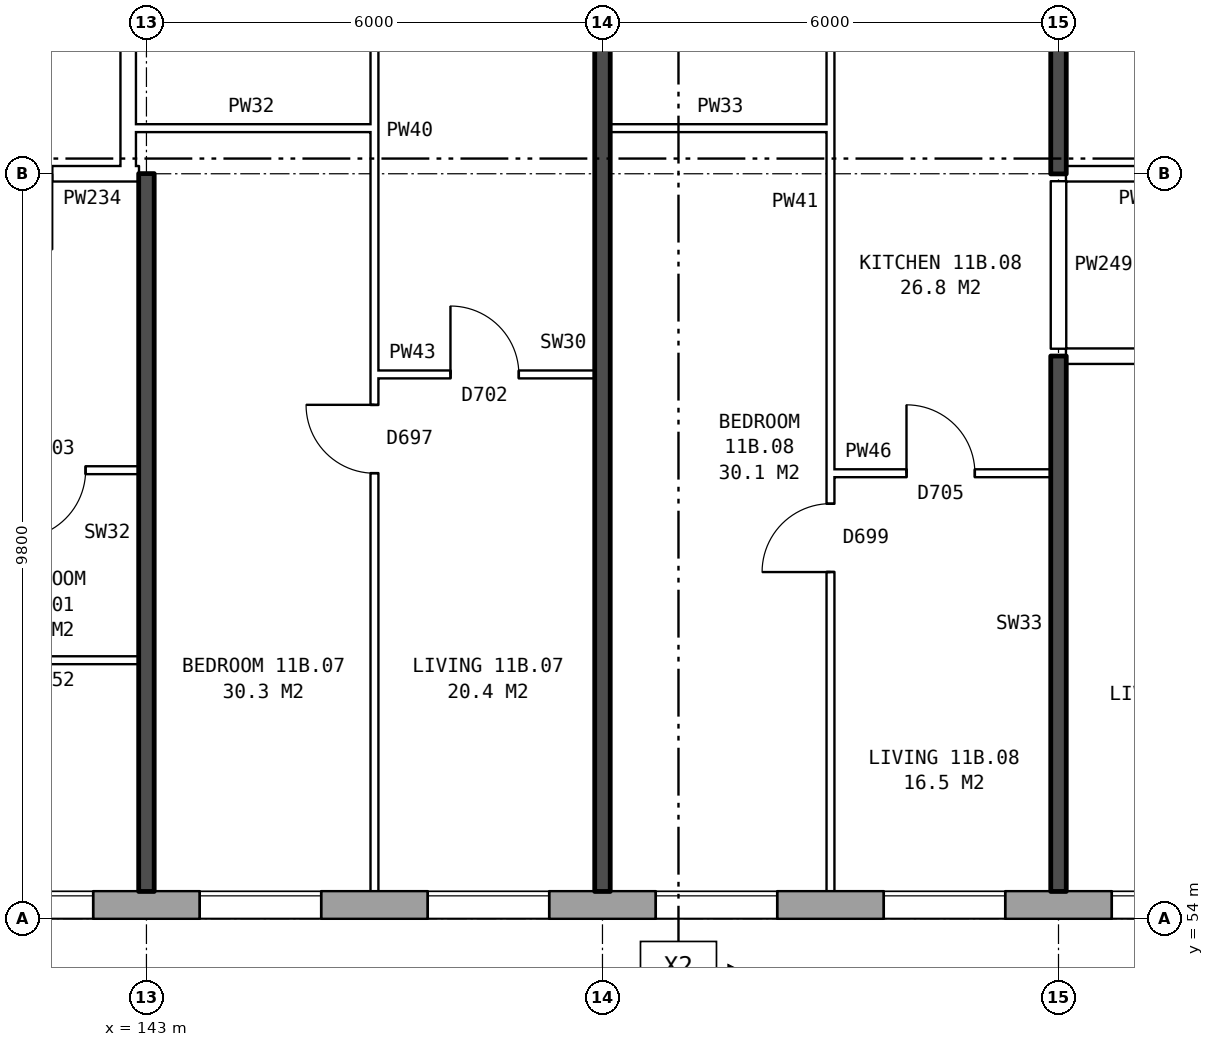
"""IFC4 building model, lengths in metres.
Left out: names, types, materials, properties, quantities, classifications, styles, units other than length and angle.
Written with IfcOpenShell. Run it as: python <this file> out.ifc"""

import sys

from ifc_helpers import new_model, si_unit, direction, frame, frame_2d, origin, place, context, subcontext, project, spatial, rectangle, extrude, element, fill, save


model = new_model("IFC4")
c1 = context("Model", 3, precision=1e-05, world=origin(), true_north=direction((0.0, 1.0)))
c2 = subcontext(c1, "Body", "Model", "MODEL_VIEW")
j1 = project(units=[si_unit("LENGTHUNIT", "METRE"), si_unit("PLANEANGLEUNIT", "RADIAN")], contexts=[c1])
p1 = place(None, origin())
s1 = spatial("IfcSite", under=j1, at=p1, CompositionType="ELEMENT")
p2 = place(p1, origin())
s2 = spatial("IfcBuilding", under=s1, at=p2, CompositionType="ELEMENT")
p3 = place(p2, frame((0.0, 0.0, 44.3)))
s3 = spatial("IfcBuildingStorey", under=s2, at=p3, CompositionType="ELEMENT", Elevation=44.3)
p4 = place(p3, frame((134.075, 54.18, 0.0), z_axis=(0.0, 0.0, 1.0), x_axis=(1.0, 0.0, 0.0)))
e1 = element("IfcWall", 1, at=p4, inside=s3, PredefinedType="STANDARD", context=c2, shape_type="SweptSolid", body=[
    extrude(rectangle(XDim=39.351, YDim=0.36, at=frame_2d((19.675, 0.0))), origin(), (0.0, 0.0, 1.0), 2.85),
])
p5 = place(p4, frame((0.3, 0.0, 0.8)))
e2 = element("IfcOpeningElement", 2, at=p5, cuts=e1, PredefinedType="OPENING", context=c2, shape_type="SweptSolid", body=[
    extrude(rectangle(XDim=0.6, YDim=0.9, at=frame_2d((0.3, 0.45))), frame((0.0, 0.19, 0.0), z_axis=(0.0, -1.0, 0.0), x_axis=(1.0, 0.0, 0.0)), (0.0, 0.0, 1.0), 0.38),
])
p6 = place(p4, frame((3.625, 0.0, 0.8)))
e3 = element("IfcOpeningElement", 3, at=p6, cuts=e1, PredefinedType="OPENING", context=c2, shape_type="SweptSolid", body=[
    extrude(rectangle(XDim=1.6, YDim=1.8, at=frame_2d((0.8, 0.9))), frame((0.0, 0.19, 0.0), z_axis=(0.0, -1.0, 0.0), x_axis=(1.0, 0.0, 0.0)), (0.0, 0.0, 1.0), 0.38),
])
p7 = place(p4, frame((6.625, 0.0, 0.8)))
e4 = element("IfcOpeningElement", 4, at=p7, cuts=e1, PredefinedType="OPENING", context=c2, shape_type="SweptSolid", body=[
    extrude(rectangle(XDim=1.6, YDim=1.8, at=frame_2d((0.8, 0.9))), frame((0.0, 0.19, 0.0), z_axis=(0.0, -1.0, 0.0), x_axis=(1.0, 0.0, 0.0)), (0.0, 0.0, 1.0), 0.38),
])
p8 = place(p4, frame((9.625, 0.0, 0.8)))
e5 = element("IfcOpeningElement", 5, at=p8, cuts=e1, PredefinedType="OPENING", context=c2, shape_type="SweptSolid", body=[
    extrude(rectangle(XDim=1.6, YDim=1.8, at=frame_2d((0.8, 0.9))), frame((0.0, 0.19, 0.0), z_axis=(0.0, -1.0, 0.0), x_axis=(1.0, 0.0, 0.0)), (0.0, 0.0, 1.0), 0.38),
])
p9 = place(p4, frame((12.625, 0.0, 0.8)))
e6 = element("IfcOpeningElement", 6, at=p9, cuts=e1, PredefinedType="OPENING", context=c2, shape_type="SweptSolid", body=[
    extrude(rectangle(XDim=1.6, YDim=1.8, at=frame_2d((0.8, 0.9))), frame((0.0, 0.19, 0.0), z_axis=(0.0, -1.0, 0.0), x_axis=(1.0, 0.0, 0.0)), (0.0, 0.0, 1.0), 0.38),
])
p10 = place(p4, frame((15.625, 0.0, 0.8)))
e7 = element("IfcOpeningElement", 7, at=p10, cuts=e1, PredefinedType="OPENING", context=c2, shape_type="SweptSolid", body=[
    extrude(rectangle(XDim=1.6, YDim=1.8, at=frame_2d((0.8, 0.9))), frame((0.0, 0.19, 0.0), z_axis=(0.0, -1.0, 0.0), x_axis=(1.0, 0.0, 0.0)), (0.0, 0.0, 1.0), 0.38),
])
p11 = place(p4, frame((18.625, 0.0, 0.8)))
e8 = element("IfcOpeningElement", 8, at=p11, cuts=e1, PredefinedType="OPENING", context=c2, shape_type="SweptSolid", body=[
    extrude(rectangle(XDim=1.6, YDim=1.8, at=frame_2d((0.8, 0.9))), frame((0.0, 0.19, 0.0), z_axis=(0.0, -1.0, 0.0), x_axis=(1.0, 0.0, 0.0)), (0.0, 0.0, 1.0), 0.38),
])
p12 = place(p4, frame((21.625, 0.0, 0.8)))
e9 = element("IfcOpeningElement", 9, at=p12, cuts=e1, PredefinedType="OPENING", context=c2, shape_type="SweptSolid", body=[
    extrude(rectangle(XDim=1.6, YDim=1.8, at=frame_2d((0.8, 0.9))), frame((0.0, 0.19, 0.0), z_axis=(0.0, -1.0, 0.0), x_axis=(1.0, 0.0, 0.0)), (0.0, 0.0, 1.0), 0.38),
])
p13 = place(p4, frame((24.625, 0.0, 0.8)))
e10 = element("IfcOpeningElement", 10, at=p13, cuts=e1, PredefinedType="OPENING", context=c2, shape_type="SweptSolid", body=[
    extrude(rectangle(XDim=1.6, YDim=1.8, at=frame_2d((0.8, 0.9))), frame((0.0, 0.19, 0.0), z_axis=(0.0, -1.0, 0.0), x_axis=(1.0, 0.0, 0.0)), (0.0, 0.0, 1.0), 0.38),
])
p14 = place(p4, frame((27.625, 0.0, 0.8)))
e11 = element("IfcOpeningElement", 11, at=p14, cuts=e1, PredefinedType="OPENING", context=c2, shape_type="SweptSolid", body=[
    extrude(rectangle(XDim=1.6, YDim=1.8, at=frame_2d((0.8, 0.9))), frame((0.0, 0.19, 0.0), z_axis=(0.0, -1.0, 0.0), x_axis=(1.0, 0.0, 0.0)), (0.0, 0.0, 1.0), 0.38),
])
p15 = place(p4, frame((30.625, 0.0, 0.8)))
e12 = element("IfcOpeningElement", 12, at=p15, cuts=e1, PredefinedType="OPENING", context=c2, shape_type="SweptSolid", body=[
    extrude(rectangle(XDim=1.6, YDim=1.8, at=frame_2d((0.8, 0.9))), frame((0.0, 0.19, 0.0), z_axis=(0.0, -1.0, 0.0), x_axis=(1.0, 0.0, 0.0)), (0.0, 0.0, 1.0), 0.38),
])
p16 = place(p4, frame((33.625, 0.0, 0.8)))
e13 = element("IfcOpeningElement", 13, at=p16, cuts=e1, PredefinedType="OPENING", context=c2, shape_type="SweptSolid", body=[
    extrude(rectangle(XDim=1.6, YDim=1.8, at=frame_2d((0.8, 0.9))), frame((0.0, 0.19, 0.0), z_axis=(0.0, -1.0, 0.0), x_axis=(1.0, 0.0, 0.0)), (0.0, 0.0, 1.0), 0.38),
])
p17 = place(p4, frame((36.625, 0.0, 0.8)))
e14 = element("IfcOpeningElement", 14, at=p17, cuts=e1, PredefinedType="OPENING", context=c2, shape_type="SweptSolid", body=[
    extrude(rectangle(XDim=1.6, YDim=1.8, at=frame_2d((0.8, 0.9))), frame((0.0, 0.19, 0.0), z_axis=(0.0, -1.0, 0.0), x_axis=(1.0, 0.0, 0.0)), (0.0, 0.0, 1.0), 0.38),
])
p18 = place(p4, frame((1.25, 0.0, 0.8)))
e15 = element("IfcOpeningElement", 15, at=p18, cuts=e1, PredefinedType="OPENING", context=c2, shape_type="SweptSolid", body=[
    extrude(rectangle(XDim=1.4, YDim=1.8, at=frame_2d((0.7, 0.9))), frame((0.0, 0.19, 0.0), z_axis=(0.0, -1.0, 0.0), x_axis=(1.0, 0.0, 0.0)), (0.0, 0.0, 1.0), 0.38),
])
p19 = place(p3, frame((142.76, 63.9, 0.0), z_axis=(0.0, 0.0, 1.0), x_axis=(0.0, 1.0, 0.0)))
e16 = element("IfcWall", 16, at=p19, inside=s3, PredefinedType="PARTITIONING", context=c2, shape_type="SweptSolid", body=[
    extrude(rectangle(XDim=12.2, YDim=0.2, at=frame_2d((6.1, 0.0))), origin(), (0.0, 0.0, 1.0), 2.85),
])
p20 = place(p19, frame((5.1, 0.0, 0.0)))
e17 = element("IfcOpeningElement", 17, at=p20, cuts=e16, PredefinedType="OPENING", context=c2, shape_type="SweptSolid", body=[
    extrude(rectangle(XDim=2.0, YDim=2.1, at=frame_2d((1.0, 1.05))), frame((0.0, 0.11, 0.0), z_axis=(0.0, -1.0, 0.0), x_axis=(1.0, 0.0, 0.0)), (0.0, 0.0, 1.0), 0.22),
])
p21 = place(p3, frame((140.6, 57.4, 0.0), z_axis=(0.0, 0.0, 1.0), x_axis=(1.0, 0.0, 0.0)))
e18 = element("IfcWall", 18, at=p21, inside=s3, PredefinedType="PARTITIONING", context=c2, shape_type="SweptSolid", body=[
    extrude(rectangle(XDim=2.3, YDim=0.1, at=frame_2d((1.15, 0.0))), origin(), (0.0, 0.0, 1.0), 2.85),
])
p22 = place(p3, frame((152.0, 59.86, 0.0), z_axis=(0.0, 0.0, 1.0), x_axis=(1.0, 0.0, 0.0)))
e19 = element("IfcWall", 19, at=p22, inside=s3, PredefinedType="PARTITIONING", context=c2, shape_type="SweptSolid", body=[
    extrude(rectangle(XDim=2.9, YDim=0.1, at=frame_2d((1.45, 0.0))), origin(), (0.0, 0.0, 1.0), 2.85),
])
p23 = place(p22, frame((1.0, 0.0, 0.0)))
e20 = element("IfcOpeningElement", 20, at=p23, cuts=e19, PredefinedType="OPENING", context=c2, shape_type="SweptSolid", body=[
    extrude(rectangle(XDim=0.9, YDim=2.1, at=frame_2d((0.45, 1.05))), frame((0.0, 0.06, 0.0), z_axis=(0.0, -1.0, 0.0), x_axis=(1.0, 0.0, 0.0)), (0.0, 0.0, 1.0), 0.12),
])
p24 = place(p3, frame((137.1, 59.9, 0.0), z_axis=(0.0, 0.0, 1.0), x_axis=(1.0, 0.0, 0.0)))
e21 = element("IfcWall", 21, at=p24, inside=s3, PredefinedType="PARTITIONING", context=c2, shape_type="SweptSolid", body=[
    extrude(rectangle(XDim=5.8, YDim=0.1, at=frame_2d((2.9, 0.0))), origin(), (0.0, 0.0, 1.0), 2.85),
])
p25 = place(p24, frame((1.3, 0.0, 0.0)))
e22 = element("IfcOpeningElement", 22, at=p25, cuts=e21, PredefinedType="OPENING", context=c2, shape_type="SweptSolid", body=[
    extrude(rectangle(XDim=0.9, YDim=2.1, at=frame_2d((0.45, 1.05))), frame((0.0, 0.06, 0.0), z_axis=(0.0, -1.0, 0.0), x_axis=(1.0, 0.0, 0.0)), (0.0, 0.0, 1.0), 0.12),
])
p26 = place(p24, frame((4.2, 0.0, 0.0)))
e23 = element("IfcOpeningElement", 23, at=p26, cuts=e21, PredefinedType="OPENING", context=c2, shape_type="SweptSolid", body=[
    extrude(rectangle(XDim=0.9, YDim=2.1, at=frame_2d((0.45, 1.05))), frame((0.0, 0.06, 0.0), z_axis=(0.0, -1.0, 0.0), x_axis=(1.0, 0.0, 0.0)), (0.0, 0.0, 1.0), 0.12),
])
p27 = place(p3, frame((146.0, 61.16, 0.0), z_axis=(0.0, 0.0, 1.0), x_axis=(1.0, 0.0, 0.0)))
e24 = element("IfcWall", 24, at=p27, inside=s3, PredefinedType="PARTITIONING", context=c2, shape_type="SweptSolid", body=[
    extrude(rectangle(XDim=2.9, YDim=0.1, at=frame_2d((1.45, 0.0))), origin(), (0.0, 0.0, 1.0), 2.85),
])
p28 = place(p27, frame((1.0, 0.0, 0.0)))
e25 = element("IfcOpeningElement", 25, at=p28, cuts=e24, PredefinedType="OPENING", context=c2, shape_type="SweptSolid", body=[
    extrude(rectangle(XDim=0.9, YDim=2.1, at=frame_2d((0.45, 1.05))), frame((0.0, 0.06, 0.0), z_axis=(0.0, -1.0, 0.0), x_axis=(1.0, 0.0, 0.0)), (0.0, 0.0, 1.0), 0.12),
])
p29 = place(p3, frame((155.1, 61.4, 0.0), z_axis=(0.0, 0.0, 1.0), x_axis=(1.0, 0.0, 0.0)))
e26 = element("IfcWall", 26, at=p29, inside=s3, PredefinedType="PARTITIONING", context=c2, shape_type="SweptSolid", body=[
    extrude(rectangle(XDim=21.04, YDim=0.2, at=frame_2d((10.52, 0.0))), origin(), (0.0, 0.0, 1.0), 2.85),
])
p30 = place(p29, frame((2.45, 0.0, 0.0)))
e27 = element("IfcOpeningElement", 27, at=p30, cuts=e26, PredefinedType="OPENING", context=c2, shape_type="SweptSolid", body=[
    extrude(rectangle(XDim=1.0, YDim=2.1, at=frame_2d((0.5, 1.05))), frame((0.0, 0.11, 0.0), z_axis=(0.0, -1.0, 0.0), x_axis=(1.0, 0.0, 0.0)), (0.0, 0.0, 1.0), 0.22),
])
p31 = place(p29, frame((14.4, 0.0, 0.0)))
e28 = element("IfcOpeningElement", 28, at=p31, cuts=e26, PredefinedType="OPENING", context=c2, shape_type="SweptSolid", body=[
    extrude(rectangle(XDim=1.0, YDim=2.1, at=frame_2d((0.5, 1.05))), frame((0.0, 0.11, 0.0), z_axis=(0.0, -1.0, 0.0), x_axis=(1.0, 0.0, 0.0)), (0.0, 0.0, 1.0), 0.22),
])
p32 = place(p3, frame((139.76, 63.8, 0.0), z_axis=(0.0, 0.0, 1.0), x_axis=(1.0, 0.0, 0.0)))
e29 = element("IfcWall", 29, at=p32, inside=s3, PredefinedType="PARTITIONING", context=c2, shape_type="SweptSolid", body=[
    extrude(rectangle(XDim=3.0, YDim=0.2, at=frame_2d((1.5, 0.0))), origin(), (0.0, 0.0, 1.0), 2.85),
])
p33 = place(p32, frame((1.0, 0.0, 0.0)))
e30 = element("IfcOpeningElement", 30, at=p33, cuts=e29, PredefinedType="OPENING", context=c2, shape_type="SweptSolid", body=[
    extrude(rectangle(XDim=1.0, YDim=2.1, at=frame_2d((0.5, 1.05))), frame((0.0, 0.11, 0.0), z_axis=(0.0, -1.0, 0.0), x_axis=(1.0, 0.0, 0.0)), (0.0, 0.0, 1.0), 0.22),
])
p34 = place(p3, frame((142.76, 63.8, 0.0), z_axis=(0.0, 0.0, 1.0), x_axis=(1.0, 0.0, 0.0)))
e31 = element("IfcWall", 31, at=p34, inside=s3, PredefinedType="PARTITIONING", context=c2, shape_type="SweptSolid", body=[
    extrude(rectangle(XDim=0.14, YDim=0.2, at=frame_2d((0.07, 0.0))), origin(), (0.0, 0.0, 1.0), 2.85),
])
p35 = place(p3, frame((155.1, 63.8, 0.0), z_axis=(0.0, 0.0, 1.0), x_axis=(1.0, 0.0, 0.0)))
e32 = element("IfcWall", 32, at=p35, inside=s3, PredefinedType="PARTITIONING", context=c2, shape_type="SweptSolid", body=[
    extrude(rectangle(XDim=2.14, YDim=0.2, at=frame_2d((1.07, 0.0))), origin(), (0.0, 0.0, 1.0), 2.85),
])
p36 = place(p3, frame((142.76, 64.4, 0.0), z_axis=(0.0, 0.0, 1.0), x_axis=(1.0, 0.0, 0.0)))
e33 = element("IfcWall", 33, at=p36, inside=s3, PredefinedType="PARTITIONING", context=c2, shape_type="SweptSolid", body=[
    extrude(rectangle(XDim=3.24, YDim=0.1, at=frame_2d((1.62, 0.0))), origin(), (0.0, 0.0, 1.0), 2.85),
])
p37 = place(p3, frame((149.1, 64.4, 0.0), z_axis=(0.0, 0.0, 1.0), x_axis=(1.0, 0.0, 0.0)))
e34 = element("IfcWall", 34, at=p37, inside=s3, PredefinedType="PARTITIONING", context=c2, shape_type="SweptSolid", body=[
    extrude(rectangle(XDim=2.9, YDim=0.1, at=frame_2d((1.45, 0.0))), origin(), (0.0, 0.0, 1.0), 2.85),
])
p38 = place(p3, frame((143.0, 54.36, 0.0), z_axis=(0.0, 0.0, 1.0), x_axis=(0.0, 1.0, 0.0)))
e35 = element("IfcWall", 35, at=p38, inside=s3, PredefinedType="SOLIDWALL", context=c2, shape_type="SweptSolid", body=[
    extrude(rectangle(XDim=9.44, YDim=0.2, at=frame_2d((4.72, 0.0))), origin(), (0.0, 0.0, 1.0), 2.85),
])
p39 = place(p3, frame((146.0, 54.36, 0.0), z_axis=(0.0, 0.0, 1.0), x_axis=(0.0, 1.0, 0.0)))
e36 = element("IfcWall", 36, at=p39, inside=s3, PredefinedType="PARTITIONING", context=c2, shape_type="SweptSolid", body=[
    extrude(rectangle(XDim=14.34, YDim=0.1, at=frame_2d((7.17, 0.0))), origin(), (0.0, 0.0, 1.0), 2.85),
])
p40 = place(p39, frame((5.5, 0.0, 0.0)))
e37 = element("IfcOpeningElement", 37, at=p40, cuts=e36, PredefinedType="OPENING", context=c2, shape_type="SweptSolid", body=[
    extrude(rectangle(XDim=0.9, YDim=2.1, at=frame_2d((0.45, 1.05))), frame((0.0, 0.06, 0.0), z_axis=(0.0, -1.0, 0.0), x_axis=(1.0, 0.0, 0.0)), (0.0, 0.0, 1.0), 0.12),
])
p41 = place(p39, frame((13.04, 0.0, 0.0)))
e38 = element("IfcOpeningElement", 38, at=p41, cuts=e36, PredefinedType="OPENING", context=c2, shape_type="SweptSolid", body=[
    extrude(rectangle(XDim=0.9, YDim=2.1, at=frame_2d((0.45, 1.05))), frame((0.0, 0.06, 0.0), z_axis=(0.0, -1.0, 0.0), x_axis=(1.0, 0.0, 0.0)), (0.0, 0.0, 1.0), 0.12),
])
p42 = place(p3, frame((149.0, 54.36, 0.0), z_axis=(0.0, 0.0, 1.0), x_axis=(0.0, 1.0, 0.0)))
e39 = element("IfcWall", 39, at=p42, inside=s3, PredefinedType="SOLIDWALL", context=c2, shape_type="SweptSolid", body=[
    extrude(rectangle(XDim=14.44, YDim=0.2, at=frame_2d((7.22, 0.0))), origin(), (0.0, 0.0, 1.0), 2.85),
])
p43 = place(p3, frame((152.0, 54.36, 0.0), z_axis=(0.0, 0.0, 1.0), x_axis=(0.0, 1.0, 0.0)))
e40 = element("IfcWall", 40, at=p43, inside=s3, PredefinedType="PARTITIONING", context=c2, shape_type="SweptSolid", body=[
    extrude(rectangle(XDim=14.34, YDim=0.1, at=frame_2d((7.17, 0.0))), origin(), (0.0, 0.0, 1.0), 2.85),
])
p44 = place(p43, frame((4.2, 0.0, 0.0)))
e41 = element("IfcOpeningElement", 41, at=p44, cuts=e40, PredefinedType="OPENING", context=c2, shape_type="SweptSolid", body=[
    extrude(rectangle(XDim=0.9, YDim=2.1, at=frame_2d((0.45, 1.05))), frame((0.0, 0.06, 0.0), z_axis=(0.0, -1.0, 0.0), x_axis=(1.0, 0.0, 0.0)), (0.0, 0.0, 1.0), 0.12),
])
p45 = place(p43, frame((13.04, 0.0, 0.0)))
e42 = element("IfcOpeningElement", 42, at=p45, cuts=e40, PredefinedType="OPENING", context=c2, shape_type="SweptSolid", body=[
    extrude(rectangle(XDim=0.9, YDim=2.1, at=frame_2d((0.45, 1.05))), frame((0.0, 0.06, 0.0), z_axis=(0.0, -1.0, 0.0), x_axis=(1.0, 0.0, 0.0)), (0.0, 0.0, 1.0), 0.12),
])
p46 = place(p3, frame((155.0, 54.36, 0.0), z_axis=(0.0, 0.0, 1.0), x_axis=(0.0, 1.0, 0.0)))
e43 = element("IfcWall", 43, at=p46, inside=s3, PredefinedType="SOLIDWALL", context=c2, shape_type="SweptSolid", body=[
    extrude(rectangle(XDim=7.04, YDim=0.2, at=frame_2d((3.52, 0.0))), origin(), (0.0, 0.0, 1.0), 2.85),
])
p47 = place(p3, frame((155.0, 61.5, 0.0), z_axis=(0.0, 0.0, 1.0), x_axis=(0.0, 1.0, 0.0)))
e44 = element("IfcWall", 44, at=p47, inside=s3, PredefinedType="PARTITIONING", context=c2, shape_type="SweptSolid", body=[
    extrude(rectangle(XDim=2.2, YDim=0.2, at=frame_2d((1.1, 0.0))), origin(), (0.0, 0.0, 1.0), 2.85),
])
p48 = place(p3, frame((155.0, 63.8, 0.0), z_axis=(0.0, 0.0, 1.0), x_axis=(0.0, 1.0, 0.0)))
e45 = element("IfcWall", 45, at=p48, inside=s3, PredefinedType="SOLIDWALL", context=c2, shape_type="SweptSolid", body=[
    extrude(rectangle(XDim=5.0, YDim=0.2, at=frame_2d((2.5, 0.0))), origin(), (0.0, 0.0, 1.0), 2.85),
])
p49 = place(p7, origin())
e46 = element("IfcWindow", 46, at=p49, inside=s3, PartitioningType="SINGLE_PANEL", PredefinedType="WINDOW", context=c2, shape_type="SweptSolid", body=[
    extrude(rectangle(XDim=1.6, YDim=1.8, at=frame_2d((0.8, 0.9))), frame((0.0, 0.15, 0.0), z_axis=(0.0, -1.0, 0.0), x_axis=(1.0, 0.0, 0.0)), (0.0, 0.0, 1.0), 0.06),
])
fill(e4, e46)
p50 = place(p8, origin())
e47 = element("IfcWindow", 47, at=p50, inside=s3, PartitioningType="SINGLE_PANEL", PredefinedType="WINDOW", context=c2, shape_type="SweptSolid", body=[
    extrude(rectangle(XDim=1.6, YDim=1.8, at=frame_2d((0.8, 0.9))), frame((0.0, 0.15, 0.0), z_axis=(0.0, -1.0, 0.0), x_axis=(1.0, 0.0, 0.0)), (0.0, 0.0, 1.0), 0.06),
])
fill(e5, e47)
p51 = place(p9, origin())
e48 = element("IfcWindow", 48, at=p51, inside=s3, PartitioningType="SINGLE_PANEL", PredefinedType="WINDOW", context=c2, shape_type="SweptSolid", body=[
    extrude(rectangle(XDim=1.6, YDim=1.8, at=frame_2d((0.8, 0.9))), frame((0.0, 0.15, 0.0), z_axis=(0.0, -1.0, 0.0), x_axis=(1.0, 0.0, 0.0)), (0.0, 0.0, 1.0), 0.06),
])
fill(e6, e48)
p52 = place(p10, origin())
e49 = element("IfcWindow", 49, at=p52, inside=s3, PartitioningType="SINGLE_PANEL", PredefinedType="WINDOW", context=c2, shape_type="SweptSolid", body=[
    extrude(rectangle(XDim=1.6, YDim=1.8, at=frame_2d((0.8, 0.9))), frame((0.0, 0.15, 0.0), z_axis=(0.0, -1.0, 0.0), x_axis=(1.0, 0.0, 0.0)), (0.0, 0.0, 1.0), 0.06),
])
fill(e7, e49)
p53 = place(p11, origin())
e50 = element("IfcWindow", 50, at=p53, inside=s3, PartitioningType="SINGLE_PANEL", PredefinedType="WINDOW", context=c2, shape_type="SweptSolid", body=[
    extrude(rectangle(XDim=1.6, YDim=1.8, at=frame_2d((0.8, 0.9))), frame((0.0, 0.15, 0.0), z_axis=(0.0, -1.0, 0.0), x_axis=(1.0, 0.0, 0.0)), (0.0, 0.0, 1.0), 0.06),
])
fill(e8, e50)
p54 = place(p12, origin())
e51 = element("IfcWindow", 51, at=p54, inside=s3, PartitioningType="SINGLE_PANEL", PredefinedType="WINDOW", context=c2, shape_type="SweptSolid", body=[
    extrude(rectangle(XDim=1.6, YDim=1.8, at=frame_2d((0.8, 0.9))), frame((0.0, 0.15, 0.0), z_axis=(0.0, -1.0, 0.0), x_axis=(1.0, 0.0, 0.0)), (0.0, 0.0, 1.0), 0.06),
])
fill(e9, e51)
p55 = place(p26, frame((0.9, 0.0, 0.0), z_axis=(0.0, 0.0, 1.0), x_axis=(-1.0, 0.0, 0.0)))
e52 = element("IfcDoor", 52, at=p55, inside=s3, OperationType="SINGLE_SWING_RIGHT", PredefinedType="DOOR", context=c2, shape_type="SweptSolid", body=[
    extrude(rectangle(XDim=0.9, YDim=2.1, at=frame_2d((0.45, 1.05))), frame((0.0, 0.025, 0.0), z_axis=(0.0, -1.0, 0.0), x_axis=(1.0, 0.0, 0.0)), (0.0, 0.0, 1.0), 0.05),
])
fill(e23, e52)
p56 = place(p40, origin())
e53 = element("IfcDoor", 53, at=p56, inside=s3, OperationType="SINGLE_SWING_RIGHT", PredefinedType="DOOR", context=c2, shape_type="SweptSolid", body=[
    extrude(rectangle(XDim=0.9, YDim=2.1, at=frame_2d((0.45, 1.05))), frame((0.0, 0.025, 0.0), z_axis=(0.0, -1.0, 0.0), x_axis=(1.0, 0.0, 0.0)), (0.0, 0.0, 1.0), 0.05),
])
fill(e37, e53)
p57 = place(p28, origin())
e54 = element("IfcDoor", 54, at=p57, inside=s3, OperationType="SINGLE_SWING_LEFT", PredefinedType="DOOR", context=c2, shape_type="SweptSolid", body=[
    extrude(rectangle(XDim=0.9, YDim=2.1, at=frame_2d((0.45, 1.05))), frame((0.0, 0.025, 0.0), z_axis=(0.0, -1.0, 0.0), x_axis=(1.0, 0.0, 0.0)), (0.0, 0.0, 1.0), 0.05),
])
fill(e25, e54)
p58 = place(p44, origin())
e55 = element("IfcDoor", 55, at=p58, inside=s3, OperationType="SINGLE_SWING_LEFT", PredefinedType="DOOR", context=c2, shape_type="SweptSolid", body=[
    extrude(rectangle(XDim=0.9, YDim=2.1, at=frame_2d((0.45, 1.05))), frame((0.0, 0.025, 0.0), z_axis=(0.0, -1.0, 0.0), x_axis=(1.0, 0.0, 0.0)), (0.0, 0.0, 1.0), 0.05),
])
fill(e41, e55)
p59 = place(p23, origin())
e56 = element("IfcDoor", 56, at=p59, inside=s3, OperationType="SINGLE_SWING_LEFT", PredefinedType="DOOR", context=c2, shape_type="SweptSolid", body=[
    extrude(rectangle(XDim=0.9, YDim=2.1, at=frame_2d((0.45, 1.05))), frame((0.0, 0.025, 0.0), z_axis=(0.0, -1.0, 0.0), x_axis=(1.0, 0.0, 0.0)), (0.0, 0.0, 1.0), 0.05),
])
fill(e20, e56)
save(model, sys.argv[1])
